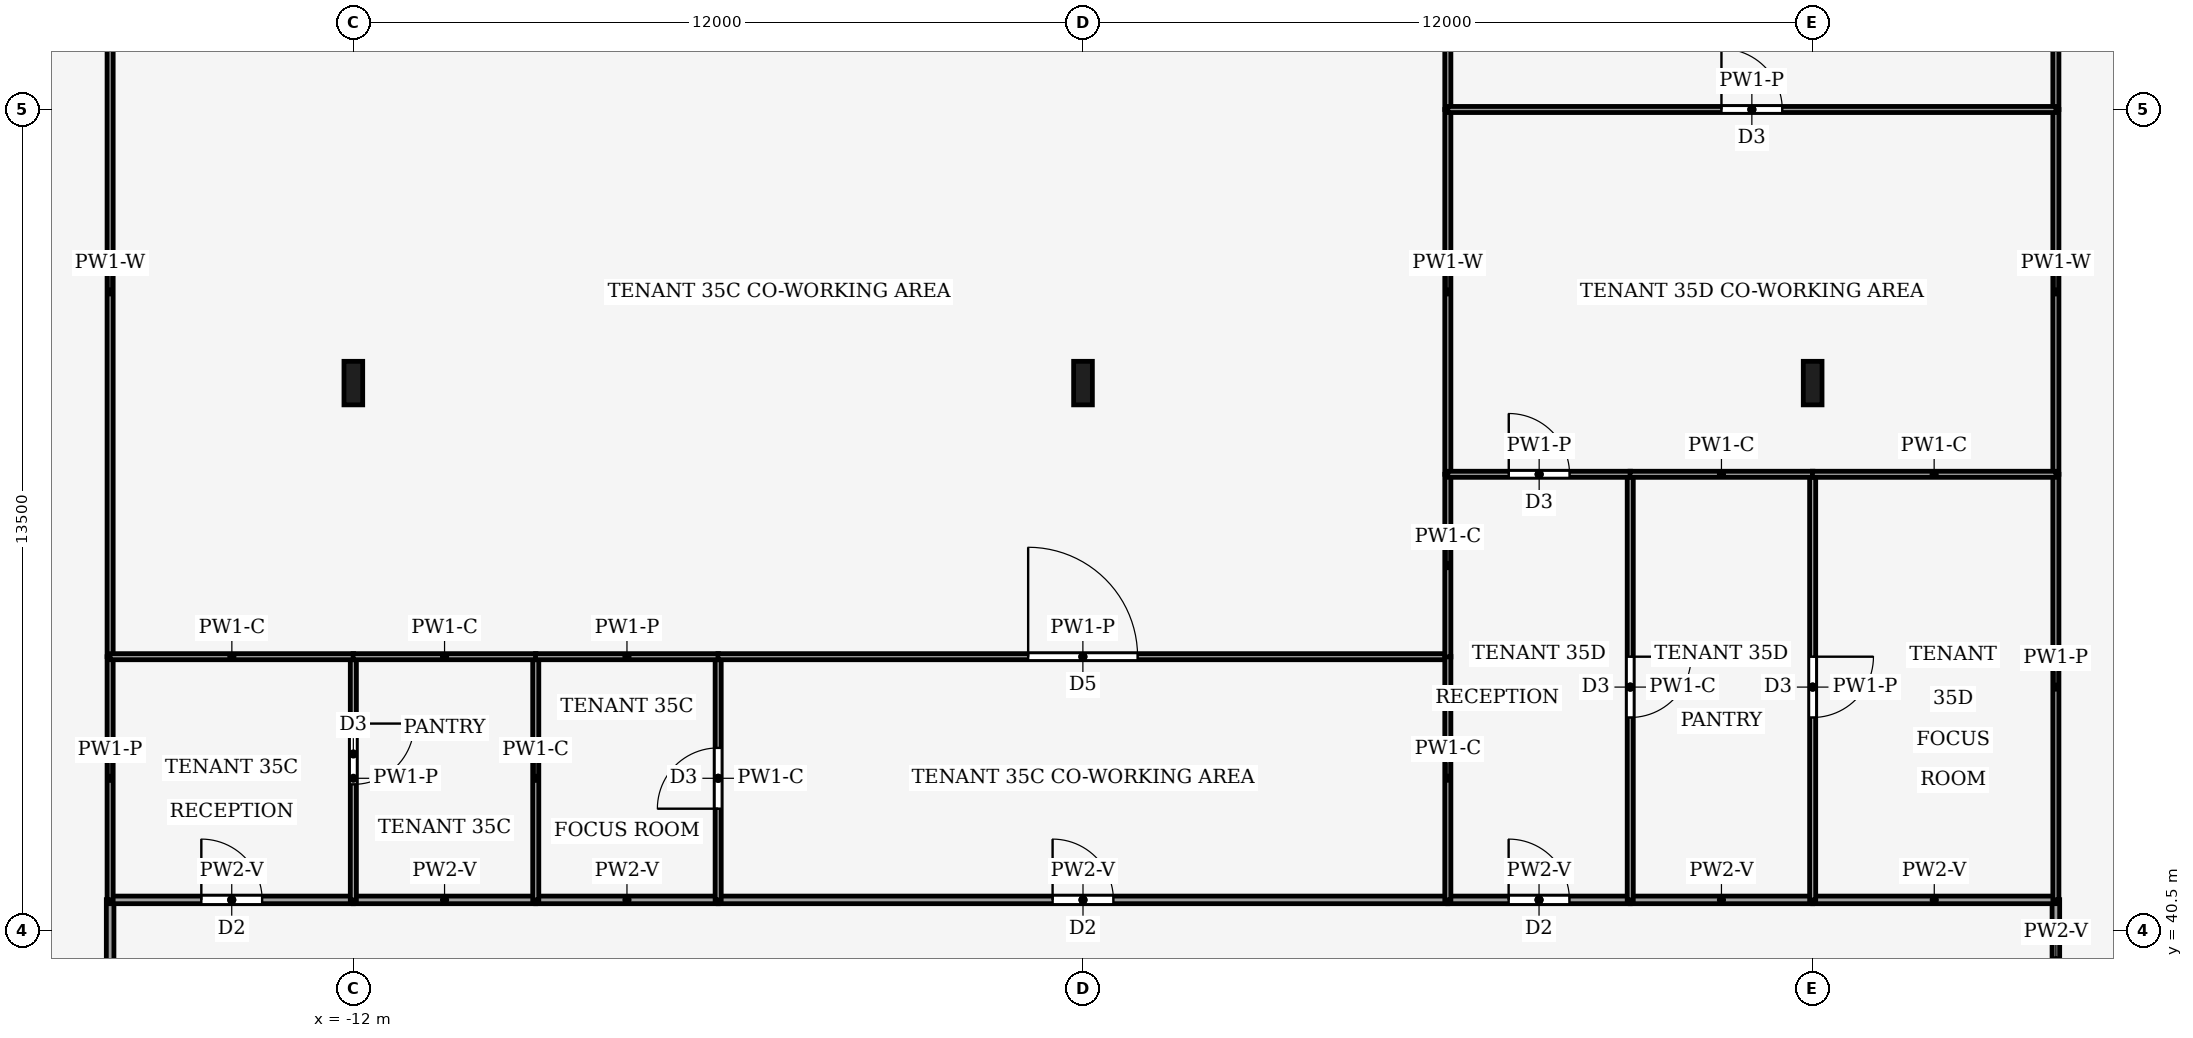
"""IFC4 building model, lengths in metres.
Left out: names, types, materials, properties, quantities, classifications, styles, units other than length and angle.
Written with IfcOpenShell. Run it as: python <this file> out.ifc"""

import sys

from ifc_helpers import new_model, si_unit, direction, frame, frame_2d, origin, origin_2d, place, context, subcontext, project, spatial, rectangle, i_section, extrude, element, fill, save


model = new_model("IFC4")
c1 = context("Model", 3, precision=1e-05, world=origin(), true_north=direction((0.0, 1.0)))
c2 = subcontext(c1, "Body", "Model", "MODEL_VIEW")
j1 = project(units=[si_unit("LENGTHUNIT", "METRE"), si_unit("PLANEANGLEUNIT", "RADIAN")], contexts=[c1])
p1 = place(None, origin())
s1 = spatial("IfcSite", under=j1, at=p1, CompositionType="ELEMENT")
p2 = place(p1, origin())
s2 = spatial("IfcBuilding", under=s1, at=p2, CompositionType="ELEMENT")
p3 = place(p2, frame((0.0, 0.0, 154.0)))
s3 = spatial("IfcBuildingStorey", under=s2, at=p3, CompositionType="ELEMENT", Elevation=154.0)
for number, where, z_axis, x_axis in (
    (1, (-12.0, 49.5, 0.0), (0.0, 0.0, 1.0), (1.0, 0.0, 0.0)),
    (2, (0.0, 49.5, 0.0), (0.0, 0.0, 1.0), (1.0, 0.0, 0.0)),
    (3, (12.0, 49.5, 0.0), (0.0, 0.0, 1.0), (1.0, 0.0, 0.0)),
):
    element("IfcColumn", number, at=place(p3, frame(where, z_axis=z_axis, x_axis=x_axis)), inside=s3, PredefinedType="COLUMN", context=c2, shape_type="SweptSolid", body=[
        extrude(i_section(OverallWidth=0.308, OverallDepth=0.716, WebThickness=0.021, FlangeThickness=0.04, FilletRadius=0.027, at=origin_2d()), origin(), (0.0, 0.0, 1.0), 4.0),
    ])
p4 = place(p3, frame((-16.0, 41.004, 0.0), z_axis=(0.0, 0.0, 1.0), x_axis=(0.0, -1.0, 0.0)))
e4 = element("IfcWall", 4, at=p4, inside=s3, PredefinedType="PARTITIONING", context=c2, shape_type="SweptSolid", body=[
    extrude(rectangle(XDim=5.004, YDim=0.125, at=frame_2d((2.502, 0.0))), origin(), (0.0, 0.0, 1.0), 3.14),
])
p5 = place(p4, frame((1.602, 0.0, 0.0)))
e5 = element("IfcOpeningElement", 5, at=p5, cuts=e4, PredefinedType="OPENING", context=c2, shape_type="SweptSolid", body=[
    extrude(rectangle(XDim=1.8, YDim=2.1, at=frame_2d((0.9, 1.05))), frame((0.0, 0.073, 0.0), z_axis=(0.0, -1.0, 0.0), x_axis=(1.0, 0.0, 0.0)), (0.0, 0.0, 1.0), 0.145),
])
p6 = place(p3, frame((16.0, 39.0, 0.0), z_axis=(0.0, 0.0, 1.0), x_axis=(0.0, 1.0, 0.0)))
e6 = element("IfcWall", 6, at=p6, inside=s3, PredefinedType="PARTITIONING", context=c2, shape_type="SweptSolid", body=[
    extrude(rectangle(XDim=2.004, YDim=0.125, at=frame_2d((1.002, 0.0))), origin(), (0.0, 0.0, 1.0), 3.44),
])
p7 = place(p3, frame((-16.0, 41.0, 0.0), z_axis=(0.0, 0.0, 1.0), x_axis=(1.0, 0.0, 0.0)))
e7 = element("IfcWall", 7, at=p7, inside=s3, PredefinedType="PARTITIONING", context=c2, shape_type="SweptSolid", body=[
    extrude(rectangle(XDim=4.0, YDim=0.125, at=frame_2d((2.0, 0.0))), origin(), (0.0, 0.0, 1.0), 3.44),
])
p8 = place(p7, frame((1.5, 0.0, 0.0)))
e8 = element("IfcOpeningElement", 8, at=p8, cuts=e7, PredefinedType="OPENING", context=c2, shape_type="SweptSolid", body=[
    extrude(rectangle(XDim=1.0, YDim=2.1, at=frame_2d((0.5, 1.05))), frame((0.0, 0.073, 0.0), z_axis=(0.0, -1.0, 0.0), x_axis=(1.0, 0.0, 0.0)), (0.0, 0.0, 1.0), 0.145),
])
for number, where, z_axis, x_axis in (
    (9, (-9.0, 41.0, 0.0), (0.0, 0.0, 1.0), (-1.0, 0.0, 0.0)),
    (10, (-6.0, 41.0, 0.0), (0.0, 0.0, 1.0), (-1.0, 0.0, 0.0)),
):
    element("IfcWall", number, at=place(p3, frame(where, z_axis=z_axis, x_axis=x_axis)), inside=s3, PredefinedType="PARTITIONING", context=c2, shape_type="SweptSolid", body=[
        extrude(rectangle(XDim=3.0, YDim=0.125, at=frame_2d((1.5, 0.0))), origin(), (0.0, 0.0, 1.0), 3.44),
    ])
p9 = place(p3, frame((-6.0, 41.0, 0.0), z_axis=(0.0, 0.0, 1.0), x_axis=(1.0, 0.0, 0.0)))
e11 = element("IfcWall", 11, at=p9, inside=s3, PredefinedType="PARTITIONING", context=c2, shape_type="SweptSolid", body=[
    extrude(rectangle(XDim=12.0, YDim=0.125, at=frame_2d((6.0, 0.0))), origin(), (0.0, 0.0, 1.0), 3.44),
])
p10 = place(p9, frame((5.5, 0.0, 0.0)))
e12 = element("IfcOpeningElement", 12, at=p10, cuts=e11, PredefinedType="OPENING", context=c2, shape_type="SweptSolid", body=[
    extrude(rectangle(XDim=1.0, YDim=2.1, at=frame_2d((0.5, 1.05))), frame((0.0, 0.073, 0.0), z_axis=(0.0, -1.0, 0.0), x_axis=(1.0, 0.0, 0.0)), (0.0, 0.0, 1.0), 0.145),
])
p11 = place(p3, frame((6.0, 41.0, 0.0), z_axis=(0.0, 0.0, 1.0), x_axis=(1.0, 0.0, 0.0)))
e13 = element("IfcWall", 13, at=p11, inside=s3, PredefinedType="PARTITIONING", context=c2, shape_type="SweptSolid", body=[
    extrude(rectangle(XDim=3.0, YDim=0.125, at=frame_2d((1.5, 0.0))), origin(), (0.0, 0.0, 1.0), 3.44),
])
p12 = place(p11, frame((1.0, 0.0, 0.0)))
e14 = element("IfcOpeningElement", 14, at=p12, cuts=e13, PredefinedType="OPENING", context=c2, shape_type="SweptSolid", body=[
    extrude(rectangle(XDim=1.0, YDim=2.1, at=frame_2d((0.5, 1.05))), frame((0.0, 0.073, 0.0), z_axis=(0.0, -1.0, 0.0), x_axis=(1.0, 0.0, 0.0)), (0.0, 0.0, 1.0), 0.145),
])
p13 = place(p3, frame((12.0, 41.0, 0.0), z_axis=(0.0, 0.0, 1.0), x_axis=(-1.0, 0.0, 0.0)))
e15 = element("IfcWall", 15, at=p13, inside=s3, PredefinedType="PARTITIONING", context=c2, shape_type="SweptSolid", body=[
    extrude(rectangle(XDim=3.0, YDim=0.125, at=frame_2d((1.5, 0.0))), origin(), (0.0, 0.0, 1.0), 3.44),
])
p14 = place(p3, frame((16.0, 41.0, 0.0), z_axis=(0.0, 0.0, 1.0), x_axis=(-1.0, 0.0, 0.0)))
e16 = element("IfcWall", 16, at=p14, inside=s3, PredefinedType="PARTITIONING", context=c2, shape_type="SweptSolid", body=[
    extrude(rectangle(XDim=4.0, YDim=0.125, at=frame_2d((2.0, 0.0))), origin(), (0.0, 0.0, 1.0), 3.44),
])
p15 = place(p3, frame((-16.0, 41.0, 0.0), z_axis=(0.0, 0.0, 1.0), x_axis=(0.0, 1.0, 0.0)))
e17 = element("IfcWall", 17, at=p15, inside=s3, PredefinedType="PARTITIONING", context=c2, shape_type="SweptSolid", body=[
    extrude(rectangle(XDim=4.0, YDim=0.1, at=frame_2d((2.0, 0.0))), origin(), (0.0, 0.0, 1.0), 3.44),
])
p16 = place(p3, frame((-16.0, 45.0, 0.0), z_axis=(0.0, 0.0, 1.0), x_axis=(0.0, 1.0, 0.0)))
e18 = element("IfcWall", 18, at=p16, inside=s3, PredefinedType="PARTITIONING", context=c2, shape_type="SweptSolid", body=[
    extrude(rectangle(XDim=12.0, YDim=0.1, at=frame_2d((6.0, 0.0))), origin(), (0.0, 0.0, 1.0), 3.24),
])
p17 = place(p3, frame((16.0, 48.0, 0.0), z_axis=(0.0, 0.0, 1.0), x_axis=(0.0, -1.0, 0.0)))
e19 = element("IfcWall", 19, at=p17, inside=s3, PredefinedType="PARTITIONING", context=c2, shape_type="SweptSolid", body=[
    extrude(rectangle(XDim=7.0, YDim=0.1, at=frame_2d((3.5, 0.0))), origin(), (0.0, 0.0, 1.0), 3.44),
])
p18 = place(p3, frame((16.0, 54.0, 0.0), z_axis=(0.0, 0.0, 1.0), x_axis=(0.0, -1.0, 0.0)))
e20 = element("IfcWall", 20, at=p18, inside=s3, PredefinedType="PARTITIONING", context=c2, shape_type="SweptSolid", body=[
    extrude(rectangle(XDim=6.0, YDim=0.1, at=frame_2d((3.0, 0.0))), origin(), (0.0, 0.0, 1.0), 3.24),
])
p19 = place(p3, frame((16.0, 60.913, 0.0), z_axis=(0.0, 0.0, 1.0), x_axis=(0.0, -1.0, 0.0)))
e21 = element("IfcWall", 21, at=p19, inside=s3, PredefinedType="PARTITIONING", context=c2, shape_type="SweptSolid", body=[
    extrude(rectangle(XDim=6.913, YDim=0.1, at=frame_2d((3.457, 0.0))), origin(), (0.0, 0.0, 1.0), 3.04),
])
p20 = place(p3, frame((-12.0, 45.0, 0.0), z_axis=(0.0, 0.0, 1.0), x_axis=(0.0, -1.0, 0.0)))
e22 = element("IfcWall", 22, at=p20, inside=s3, PredefinedType="PARTITIONING", context=c2, shape_type="SweptSolid", body=[
    extrude(rectangle(XDim=4.0, YDim=0.1, at=frame_2d((2.0, 0.0))), origin(), (0.0, 0.0, 1.0), 3.44),
])
p21 = place(p20, frame((1.1, 0.0, 0.0)))
e23 = element("IfcOpeningElement", 23, at=p21, cuts=e22, PredefinedType="OPENING", context=c2, shape_type="SweptSolid", body=[
    extrude(rectangle(XDim=1.0, YDim=2.1, at=frame_2d((0.5, 1.05))), frame((0.0, 0.06, 0.0), z_axis=(0.0, -1.0, 0.0), x_axis=(1.0, 0.0, 0.0)), (0.0, 0.0, 1.0), 0.12),
])
p22 = place(p3, frame((-11.996, 45.0, 0.0), z_axis=(0.0, 0.0, 1.0), x_axis=(-1.0, 0.0, 0.0)))
e24 = element("IfcWall", 24, at=p22, inside=s3, PredefinedType="PARTITIONING", context=c2, shape_type="SweptSolid", body=[
    extrude(rectangle(XDim=4.004, YDim=0.1, at=frame_2d((2.002, 0.0))), origin(), (0.0, 0.0, 1.0), 3.87),
])
p23 = place(p3, frame((-9.0, 41.0, 0.0), z_axis=(0.0, 0.0, 1.0), x_axis=(0.0, 1.0, 0.0)))
e25 = element("IfcWall", 25, at=p23, inside=s3, PredefinedType="PARTITIONING", context=c2, shape_type="SweptSolid", body=[
    extrude(rectangle(XDim=4.0, YDim=0.1, at=frame_2d((2.0, 0.0))), origin(), (0.0, 0.0, 1.0), 3.87),
])
p24 = place(p3, frame((-8.996, 45.0, 0.0), z_axis=(0.0, 0.0, 1.0), x_axis=(-1.0, 0.0, 0.0)))
e26 = element("IfcWall", 26, at=p24, inside=s3, PredefinedType="PARTITIONING", context=c2, shape_type="SweptSolid", body=[
    extrude(rectangle(XDim=3.008, YDim=0.1, at=frame_2d((1.504, 0.0))), origin(), (0.0, 0.0, 1.0), 3.87),
])
p25 = place(p3, frame((-6.0, 41.0, 0.0), z_axis=(0.0, 0.0, 1.0), x_axis=(0.0, 1.0, 0.0)))
e27 = element("IfcWall", 27, at=p25, inside=s3, PredefinedType="PARTITIONING", context=c2, shape_type="SweptSolid", body=[
    extrude(rectangle(XDim=4.0, YDim=0.1, at=frame_2d((2.0, 0.0))), origin(), (0.0, 0.0, 1.0), 3.87),
])
p26 = place(p25, frame((1.5, 0.0, 0.0)))
e28 = element("IfcOpeningElement", 28, at=p26, cuts=e27, PredefinedType="OPENING", context=c2, shape_type="SweptSolid", body=[
    extrude(rectangle(XDim=1.0, YDim=2.1, at=frame_2d((0.5, 1.05))), frame((0.0, 0.06, 0.0), z_axis=(0.0, -1.0, 0.0), x_axis=(1.0, 0.0, 0.0)), (0.0, 0.0, 1.0), 0.12),
])
p27 = place(p3, frame((-5.996, 45.0, 0.0), z_axis=(0.0, 0.0, 1.0), x_axis=(-1.0, 0.0, 0.0)))
e29 = element("IfcWall", 29, at=p27, inside=s3, PredefinedType="PARTITIONING", context=c2, shape_type="SweptSolid", body=[
    extrude(rectangle(XDim=3.008, YDim=0.1, at=frame_2d((1.504, 0.0))), origin(), (0.0, 0.0, 1.0), 3.44),
])
p28 = place(p3, frame((-6.004, 45.0, 0.0), z_axis=(0.0, 0.0, 1.0), x_axis=(1.0, 0.0, 0.0)))
e30 = element("IfcWall", 30, at=p28, inside=s3, PredefinedType="PARTITIONING", context=c2, shape_type="SweptSolid", body=[
    extrude(rectangle(XDim=12.004, YDim=0.1, at=frame_2d((6.002, 0.0))), origin(), (0.0, 0.0, 1.0), 3.44),
])
p29 = place(p28, frame((5.102, 0.0, 0.0)))
e31 = element("IfcOpeningElement", 31, at=p29, cuts=e30, PredefinedType="OPENING", context=c2, shape_type="SweptSolid", body=[
    extrude(rectangle(XDim=1.8, YDim=2.1, at=frame_2d((0.9, 1.05))), frame((0.0, 0.06, 0.0), z_axis=(0.0, -1.0, 0.0), x_axis=(1.0, 0.0, 0.0)), (0.0, 0.0, 1.0), 0.12),
])
p30 = place(p3, frame((6.0, 41.0, 0.0), z_axis=(0.0, 0.0, 1.0), x_axis=(0.0, 1.0, 0.0)))
e32 = element("IfcWall", 32, at=p30, inside=s3, PredefinedType="PARTITIONING", context=c2, shape_type="SweptSolid", body=[
    extrude(rectangle(XDim=4.004, YDim=0.1, at=frame_2d((2.002, 0.0))), origin(), (0.0, 0.0, 1.0), 3.87),
])
p31 = place(p3, frame((6.0, 44.996, 0.0), z_axis=(0.0, 0.0, 1.0), x_axis=(0.0, 1.0, 0.0)))
e33 = element("IfcWall", 33, at=p31, inside=s3, PredefinedType="PARTITIONING", context=c2, shape_type="SweptSolid", body=[
    extrude(rectangle(XDim=3.004, YDim=0.1, at=frame_2d((1.502, 0.0))), origin(), (0.0, 0.0, 1.0), 3.87),
])
p32 = place(p3, frame((6.0, 48.0, 0.0), z_axis=(0.0, 0.0, 1.0), x_axis=(0.0, 1.0, 0.0)))
e34 = element("IfcWall", 34, at=p32, inside=s3, PredefinedType="PARTITIONING", context=c2, shape_type="SweptSolid", body=[
    extrude(rectangle(XDim=6.0, YDim=0.1, at=frame_2d((3.0, 0.0))), origin(), (0.0, 0.0, 1.0), 3.24),
])
p33 = place(p3, frame((6.0, 54.0, 0.0), z_axis=(0.0, 0.0, 1.0), x_axis=(0.0, 1.0, 0.0)))
e35 = element("IfcWall", 35, at=p33, inside=s3, PredefinedType="PARTITIONING", context=c2, shape_type="SweptSolid", body=[
    extrude(rectangle(XDim=3.004, YDim=0.1, at=frame_2d((1.502, 0.0))), origin(), (0.0, 0.0, 1.0), 3.87),
])
p34 = place(p3, frame((9.0, 48.0, 0.0), z_axis=(0.0, 0.0, 1.0), x_axis=(0.0, -1.0, 0.0)))
e36 = element("IfcWall", 36, at=p34, inside=s3, PredefinedType="PARTITIONING", context=c2, shape_type="SweptSolid", body=[
    extrude(rectangle(XDim=7.0, YDim=0.1, at=frame_2d((3.5, 0.0))), origin(), (0.0, 0.0, 1.0), 3.87),
])
p35 = place(p34, frame((3.0, 0.0, 0.0)))
e37 = element("IfcOpeningElement", 37, at=p35, cuts=e36, PredefinedType="OPENING", context=c2, shape_type="SweptSolid", body=[
    extrude(rectangle(XDim=1.0, YDim=2.1, at=frame_2d((0.5, 1.05))), frame((0.0, 0.06, 0.0), z_axis=(0.0, -1.0, 0.0), x_axis=(1.0, 0.0, 0.0)), (0.0, 0.0, 1.0), 0.12),
])
p36 = place(p3, frame((6.0, 48.0, 0.0), z_axis=(0.0, 0.0, 1.0), x_axis=(1.0, 0.0, 0.0)))
e38 = element("IfcWall", 38, at=p36, inside=s3, PredefinedType="PARTITIONING", context=c2, shape_type="SweptSolid", body=[
    extrude(rectangle(XDim=3.004, YDim=0.1, at=frame_2d((1.502, 0.0))), origin(), (0.0, 0.0, 1.0), 3.44),
])
p37 = place(p36, frame((1.002, 0.0, 0.0)))
e39 = element("IfcOpeningElement", 39, at=p37, cuts=e38, PredefinedType="OPENING", context=c2, shape_type="SweptSolid", body=[
    extrude(rectangle(XDim=1.0, YDim=2.1, at=frame_2d((0.5, 1.05))), frame((0.0, 0.06, 0.0), z_axis=(0.0, -1.0, 0.0), x_axis=(1.0, 0.0, 0.0)), (0.0, 0.0, 1.0), 0.12),
])
p38 = place(p3, frame((12.0, 48.0, 0.0), z_axis=(0.0, 0.0, 1.0), x_axis=(0.0, -1.0, 0.0)))
e40 = element("IfcWall", 40, at=p38, inside=s3, PredefinedType="PARTITIONING", context=c2, shape_type="SweptSolid", body=[
    extrude(rectangle(XDim=7.0, YDim=0.1, at=frame_2d((3.5, 0.0))), origin(), (0.0, 0.0, 1.0), 3.44),
])
p39 = place(p38, frame((3.0, 0.0, 0.0)))
e41 = element("IfcOpeningElement", 41, at=p39, cuts=e40, PredefinedType="OPENING", context=c2, shape_type="SweptSolid", body=[
    extrude(rectangle(XDim=1.0, YDim=2.1, at=frame_2d((0.5, 1.05))), frame((0.0, 0.06, 0.0), z_axis=(0.0, -1.0, 0.0), x_axis=(1.0, 0.0, 0.0)), (0.0, 0.0, 1.0), 0.12),
])
p40 = place(p3, frame((12.004, 48.0, 0.0), z_axis=(0.0, 0.0, 1.0), x_axis=(-1.0, 0.0, 0.0)))
e42 = element("IfcWall", 42, at=p40, inside=s3, PredefinedType="PARTITIONING", context=c2, shape_type="SweptSolid", body=[
    extrude(rectangle(XDim=3.008, YDim=0.1, at=frame_2d((1.504, 0.0))), origin(), (0.0, 0.0, 1.0), 3.87),
])
p41 = place(p3, frame((16.0, 48.0, 0.0), z_axis=(0.0, 0.0, 1.0), x_axis=(-1.0, 0.0, 0.0)))
e43 = element("IfcWall", 43, at=p41, inside=s3, PredefinedType="PARTITIONING", context=c2, shape_type="SweptSolid", body=[
    extrude(rectangle(XDim=4.004, YDim=0.1, at=frame_2d((2.002, 0.0))), origin(), (0.0, 0.0, 1.0), 3.87),
])
p42 = place(p3, frame((6.0, 54.0, 0.0), z_axis=(0.0, 0.0, 1.0), x_axis=(1.0, 0.0, 0.0)))
e44 = element("IfcWall", 44, at=p42, inside=s3, PredefinedType="PARTITIONING", context=c2, shape_type="SweptSolid", body=[
    extrude(rectangle(XDim=10.0, YDim=0.1, at=frame_2d((5.0, 0.0))), origin(), (0.0, 0.0, 1.0), 3.44),
])
p43 = place(p42, frame((4.5, 0.0, 0.0)))
e45 = element("IfcOpeningElement", 45, at=p43, cuts=e44, PredefinedType="OPENING", context=c2, shape_type="SweptSolid", body=[
    extrude(rectangle(XDim=1.0, YDim=2.1, at=frame_2d((0.5, 1.05))), frame((0.0, 0.06, 0.0), z_axis=(0.0, -1.0, 0.0), x_axis=(1.0, 0.0, 0.0)), (0.0, 0.0, 1.0), 0.12),
])
p44 = place(p8, origin())
e46 = element("IfcDoor", 46, at=p44, inside=s3, OperationType="SINGLE_SWING_LEFT", PredefinedType="DOOR", context=c2, shape_type="SweptSolid", body=[
    extrude(rectangle(XDim=1.0, YDim=2.1, at=frame_2d((0.5, 1.05))), frame((0.0, 0.025, 0.0), z_axis=(0.0, -1.0, 0.0), x_axis=(1.0, 0.0, 0.0)), (0.0, 0.0, 1.0), 0.05),
])
fill(e8, e46)
p45 = place(p10, origin())
e47 = element("IfcDoor", 47, at=p45, inside=s3, OperationType="SINGLE_SWING_RIGHT", PredefinedType="DOOR", context=c2, shape_type="SweptSolid", body=[
    extrude(rectangle(XDim=1.0, YDim=2.1, at=frame_2d((0.5, 1.05))), frame((0.0, 0.025, 0.0), z_axis=(0.0, -1.0, 0.0), x_axis=(1.0, 0.0, 0.0)), (0.0, 0.0, 1.0), 0.05),
])
fill(e12, e47)
p46 = place(p12, origin())
e48 = element("IfcDoor", 48, at=p46, inside=s3, OperationType="SINGLE_SWING_LEFT", PredefinedType="DOOR", context=c2, shape_type="SweptSolid", body=[
    extrude(rectangle(XDim=1.0, YDim=2.1, at=frame_2d((0.5, 1.05))), frame((0.0, 0.025, 0.0), z_axis=(0.0, -1.0, 0.0), x_axis=(1.0, 0.0, 0.0)), (0.0, 0.0, 1.0), 0.05),
])
fill(e14, e48)
p47 = place(p21, origin())
e49 = element("IfcDoor", 49, at=p47, inside=s3, OperationType="SINGLE_SWING_LEFT", PredefinedType="DOOR", context=c2, shape_type="SweptSolid", body=[
    extrude(rectangle(XDim=1.0, YDim=2.1, at=frame_2d((0.5, 1.05))), frame((0.0, 0.025, 0.0), z_axis=(0.0, -1.0, 0.0), x_axis=(1.0, 0.0, 0.0)), (0.0, 0.0, 1.0), 0.05),
])
fill(e23, e49)
p48 = place(p26, origin())
e50 = element("IfcDoor", 50, at=p48, inside=s3, OperationType="SINGLE_SWING_LEFT", PredefinedType="DOOR", context=c2, shape_type="SweptSolid", body=[
    extrude(rectangle(XDim=1.0, YDim=2.1, at=frame_2d((0.5, 1.05))), frame((0.0, 0.025, 0.0), z_axis=(0.0, -1.0, 0.0), x_axis=(1.0, 0.0, 0.0)), (0.0, 0.0, 1.0), 0.05),
])
fill(e28, e50)
p49 = place(p29, origin())
e51 = element("IfcDoor", 51, at=p49, inside=s3, OperationType="DOUBLE_DOOR_SINGLE_SWING", PredefinedType="DOOR", context=c2, shape_type="SweptSolid", body=[
    extrude(rectangle(XDim=1.8, YDim=2.1, at=frame_2d((0.9, 1.05))), frame((0.0, 0.025, 0.0), z_axis=(0.0, -1.0, 0.0), x_axis=(1.0, 0.0, 0.0)), (0.0, 0.0, 1.0), 0.05),
])
fill(e31, e51)
p50 = place(p35, origin())
e52 = element("IfcDoor", 52, at=p50, inside=s3, OperationType="SINGLE_SWING_RIGHT", PredefinedType="DOOR", context=c2, shape_type="SweptSolid", body=[
    extrude(rectangle(XDim=1.0, YDim=2.1, at=frame_2d((0.5, 1.05))), frame((0.0, 0.025, 0.0), z_axis=(0.0, -1.0, 0.0), x_axis=(1.0, 0.0, 0.0)), (0.0, 0.0, 1.0), 0.05),
])
fill(e37, e52)
p51 = place(p37, origin())
e53 = element("IfcDoor", 53, at=p51, inside=s3, OperationType="SINGLE_SWING_LEFT", PredefinedType="DOOR", context=c2, shape_type="SweptSolid", body=[
    extrude(rectangle(XDim=1.0, YDim=2.1, at=frame_2d((0.5, 1.05))), frame((0.0, 0.025, 0.0), z_axis=(0.0, -1.0, 0.0), x_axis=(1.0, 0.0, 0.0)), (0.0, 0.0, 1.0), 0.05),
])
fill(e39, e53)
p52 = place(p39, origin())
e54 = element("IfcDoor", 54, at=p52, inside=s3, OperationType="SINGLE_SWING_RIGHT", PredefinedType="DOOR", context=c2, shape_type="SweptSolid", body=[
    extrude(rectangle(XDim=1.0, YDim=2.1, at=frame_2d((0.5, 1.05))), frame((0.0, 0.025, 0.0), z_axis=(0.0, -1.0, 0.0), x_axis=(1.0, 0.0, 0.0)), (0.0, 0.0, 1.0), 0.05),
])
fill(e41, e54)
p53 = place(p43, origin())
e55 = element("IfcDoor", 55, at=p53, inside=s3, OperationType="SINGLE_SWING_LEFT", PredefinedType="DOOR", context=c2, shape_type="SweptSolid", body=[
    extrude(rectangle(XDim=1.0, YDim=2.1, at=frame_2d((0.5, 1.05))), frame((0.0, 0.025, 0.0), z_axis=(0.0, -1.0, 0.0), x_axis=(1.0, 0.0, 0.0)), (0.0, 0.0, 1.0), 0.05),
])
fill(e45, e55)
save(model, sys.argv[1])
